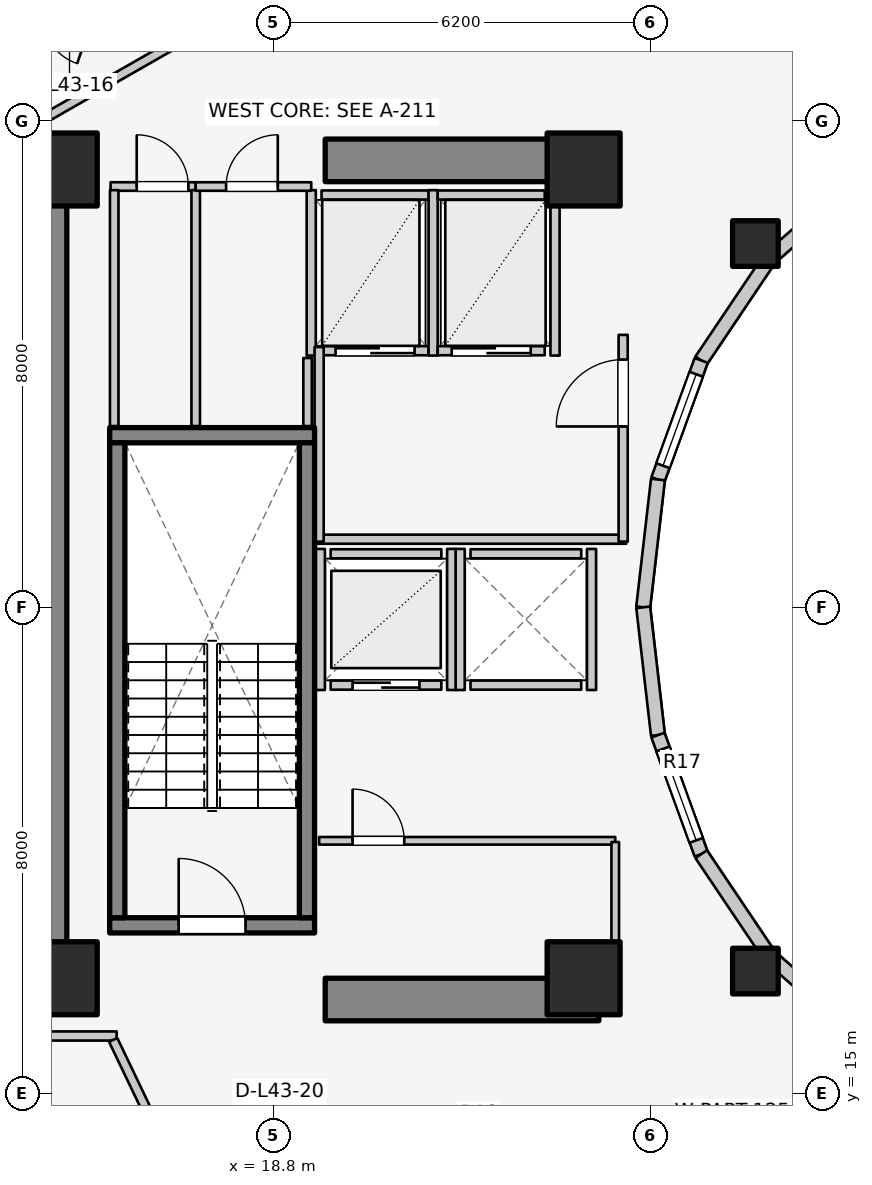
"""IFC4 building model, lengths in metres.
Left out: names, types, materials, properties, quantities, classifications, styles, units other than length and angle.
Written with IfcOpenShell. Run it as: python <this file> out.ifc"""

import sys

from ifc_helpers import new_model, si_unit, direction, frame, frame_2d, origin, origin_2d, place, context, subcontext, project, spatial, rectangle, extrude, element, fill, save


model = new_model("IFC4")
c1 = context("Model", 3, precision=1e-05, world=origin(), true_north=direction((0.0, 1.0)))
c2 = subcontext(c1, "Body", "Model", "MODEL_VIEW")
j1 = project(units=[si_unit("LENGTHUNIT", "METRE"), si_unit("PLANEANGLEUNIT", "RADIAN")], contexts=[c1])
p1 = place(None, origin())
s1 = spatial("IfcSite", under=j1, at=p1, CompositionType="ELEMENT")
p2 = place(p1, origin())
s2 = spatial("IfcBuilding", under=s1, at=p2, CompositionType="ELEMENT")
p3 = place(p2, frame((0.0, 0.0, 143.6)))
s3 = spatial("IfcBuildingStorey", under=s2, at=p3, CompositionType="ELEMENT", Elevation=143.6)
p4 = place(p3, frame((15.05, 17.05, 0.0), z_axis=(0.0, 0.0, 1.0), x_axis=(0.0, 1.0, 0.0)))
e1 = element("IfcWall", 1, at=p4, inside=s3, PredefinedType="SHEAR", context=c2, shape_type="SweptSolid", body=[
    extrude(rectangle(XDim=12.8, YDim=0.7, at=frame_2d((6.4, 0.0))), origin(), (0.0, 0.0, 1.0), 3.1),
])
for number, where, z_axis, x_axis in (
    (2, (19.65, 16.55, 0.0), (0.0, 0.0, 1.0), (1.0, 0.0, 0.0)),
    (3, (19.65, 30.35, 0.0), (0.0, 0.0, 1.0), (1.0, 0.0, 0.0)),
):
    element("IfcWall", number, at=place(p3, frame(where, z_axis=z_axis, x_axis=x_axis)), inside=s3, PredefinedType="SHEAR", context=c2, shape_type="SweptSolid", body=[
        extrude(rectangle(XDim=4.5, YDim=0.7, at=frame_2d((2.25, 0.0))), origin(), (0.0, 0.0, 1.0), 3.1),
    ])
p5 = place(p3, frame((16.105, 17.77, 0.0), z_axis=(0.0, 0.0, 1.0), x_axis=(1.0, 0.0, 0.0)))
e4 = element("IfcWall", 4, at=p5, inside=s3, PredefinedType="SOLIDWALL", context=c2, shape_type="SweptSolid", body=[
    extrude(rectangle(XDim=3.37, YDim=0.25, at=frame_2d((1.685, 0.0))), origin(), (0.0, 0.0, 1.0), 3.1),
])
p6 = place(p5, frame((1.135, 0.0, 0.0)))
e5 = element("IfcOpeningElement", 5, at=p6, cuts=e4, PredefinedType="OPENING", context=c2, shape_type="SweptSolid", body=[
    extrude(rectangle(XDim=1.1, YDim=2.1, at=frame_2d((0.55, 1.05))), frame((0.0, 0.135, 0.0), z_axis=(0.0, -1.0, 0.0), x_axis=(1.0, 0.0, 0.0)), (0.0, 0.0, 1.0), 0.27),
])
p7 = place(p3, frame((16.105, 25.83, 0.0), z_axis=(0.0, 0.0, 1.0), x_axis=(1.0, 0.0, 0.0)))
e6 = element("IfcWall", 6, at=p7, inside=s3, PredefinedType="SOLIDWALL", context=c2, shape_type="SweptSolid", body=[
    extrude(rectangle(XDim=3.37, YDim=0.25, at=frame_2d((1.685, 0.0))), origin(), (0.0, 0.0, 1.0), 3.1),
])
for number, where, z_axis, x_axis in (
    (7, (16.23, 17.895, 0.0), (0.0, 0.0, 1.0), (0.0, 1.0, 0.0)),
    (8, (19.35, 17.895, 0.0), (0.0, 0.0, 1.0), (0.0, 1.0, 0.0)),
):
    element("IfcWall", number, at=place(p3, frame(where, z_axis=z_axis, x_axis=x_axis)), inside=s3, PredefinedType="SOLIDWALL", context=c2, shape_type="SweptSolid", body=[
        extrude(rectangle(XDim=7.81, YDim=0.25, at=frame_2d((3.905, 0.0))), origin(), (0.0, 0.0, 1.0), 3.1),
    ])
for number, where, z_axis, x_axis in (
    (9, (15.3, 16.9, 0.0), (0.0, 0.0, 1.0), (1.0, 0.0, 0.0)),
    (10, (23.9, 16.9, 0.0), (0.0, 0.0, 1.0), (1.0, 0.0, 0.0)),
    (11, (23.9, 30.2, 0.0), (0.0, 0.0, 1.0), (1.0, 0.0, 0.0)),
    (12, (15.3, 30.2, 0.0), (0.0, 0.0, 1.0), (1.0, 0.0, 0.0)),
):
    element("IfcColumn", number, at=place(p3, frame(where, z_axis=z_axis, x_axis=x_axis)), inside=s3, PredefinedType="COLUMN", context=c2, shape_type="SweptSolid", body=[
        extrude(rectangle(XDim=1.2, YDim=1.2, at=origin_2d()), origin(), (0.0, 0.0, 1.0), 3.1),
    ])
for number, where, z_axis, x_axis in (
    (13, (26.725, 28.982, 0.0), (0.0, 0.0, 1.0), (1.0, 0.0, 0.0)),
    (14, (26.725, 17.018, 0.0), (0.0, 0.0, 1.0), (1.0, 0.0, 0.0)),
):
    element("IfcColumn", number, at=place(p3, frame(where, z_axis=z_axis, x_axis=x_axis)), inside=s3, PredefinedType="COLUMN", context=c2, shape_type="SweptSolid", body=[
        extrude(rectangle(XDim=0.75, YDim=0.75, at=origin_2d()), origin(), (0.0, 0.0, 1.0), 3.1),
    ])
p8 = place(p3, frame((28.44, 30.032, 0.0), z_axis=(0.0, 0.0, 1.0), x_axis=(-0.752576694707, -0.658504607869, 0.0)))
e15 = element("IfcWall", 15, at=p8, inside=s3, PredefinedType="STANDARD", context=c2, shape_type="SweptSolid", body=[
    extrude(rectangle(XDim=1.959, YDim=0.23, at=frame_2d((0.98, 0.0))), origin(), (0.0, 0.0, 1.0), 2.16),
])
p9 = place(p3, frame((26.965, 28.742, 0.0), z_axis=(0.0, 0.0, 1.0), x_axis=(-0.558197800898, -0.829707909492, 0.0)))
e16 = element("IfcWall", 16, at=p9, inside=s3, PredefinedType="STANDARD", context=c2, shape_type="SweptSolid", body=[
    extrude(rectangle(XDim=2.027, YDim=0.23, at=frame_2d((1.013, 0.0))), origin(), (0.0, 0.0, 1.0), 2.16),
])
p10 = place(p3, frame((25.834, 27.06, 0.0), z_axis=(0.0, 0.0, 1.0), x_axis=(-0.341423187295, -0.93990968033, 0.0)))
e17 = element("IfcWall", 17, at=p10, inside=s3, PredefinedType="STANDARD", context=c2, shape_type="SweptSolid", body=[
    extrude(rectangle(XDim=2.084, YDim=0.23, at=frame_2d((1.042, 0.0))), origin(), (0.0, 0.0, 1.0), 2.84),
])
p11 = place(p10, frame((0.242, 0.0, 0.85)))
e18 = element("IfcOpeningElement", 18, at=p11, cuts=e17, PredefinedType="OPENING", context=c2, shape_type="SweptSolid", body=[
    extrude(rectangle(XDim=1.6, YDim=1.65, at=frame_2d((0.8, 0.825))), frame((0.0, 0.125, 0.0), z_axis=(0.0, -1.0, 0.0), x_axis=(1.0, 0.0, 0.0)), (0.0, 0.0, 1.0), 0.25),
])
for number, where, z_axis, x_axis in (
    (19, (25.123, 25.102, 0.0), (0.0, 0.0, 1.0), (-0.115, -0.993, 0.0)),
    (20, (24.88, 23.0, 0.0), (0.0, 0.0, 1.0), (0.115, -0.993, 0.0)),
):
    element("IfcWall", number, at=place(p3, frame(where, z_axis=z_axis, x_axis=x_axis)), inside=s3, PredefinedType="STANDARD", context=c2, shape_type="SweptSolid", body=[
        extrude(rectangle(XDim=2.115, YDim=0.23, at=frame_2d((1.058, 0.0))), origin(), (0.0, 0.0, 1.0), 2.84),
    ])
p12 = place(p3, frame((25.123, 20.898, 0.0), z_axis=(0.0, 0.0, 1.0), x_axis=(0.341423187295, -0.93990968033, 0.0)))
e21 = element("IfcWall", 21, at=p12, inside=s3, PredefinedType="STANDARD", context=c2, shape_type="SweptSolid", body=[
    extrude(rectangle(XDim=2.084, YDim=0.23, at=frame_2d((1.042, 0.0))), origin(), (0.0, 0.0, 1.0), 2.84),
])
p13 = place(p12, frame((0.242, 0.0, 0.85)))
e22 = element("IfcOpeningElement", 22, at=p13, cuts=e21, PredefinedType="OPENING", context=c2, shape_type="SweptSolid", body=[
    extrude(rectangle(XDim=1.6, YDim=1.65, at=frame_2d((0.8, 0.825))), frame((0.0, 0.125, 0.0), z_axis=(0.0, -1.0, 0.0), x_axis=(1.0, 0.0, 0.0)), (0.0, 0.0, 1.0), 0.25),
])
p14 = place(p3, frame((25.834, 18.94, 0.0), z_axis=(0.0, 0.0, 1.0), x_axis=(0.558197800898, -0.829707909492, 0.0)))
e23 = element("IfcWall", 23, at=p14, inside=s3, PredefinedType="STANDARD", context=c2, shape_type="SweptSolid", body=[
    extrude(rectangle(XDim=2.027, YDim=0.23, at=frame_2d((1.013, 0.0))), origin(), (0.0, 0.0, 1.0), 2.16),
])
p15 = place(p3, frame((26.965, 17.258, 0.0), z_axis=(0.0, 0.0, 1.0), x_axis=(0.752576694707, -0.658504607869, 0.0)))
e24 = element("IfcWall", 24, at=p15, inside=s3, PredefinedType="STANDARD", context=c2, shape_type="SweptSolid", body=[
    extrude(rectangle(XDim=1.959, YDim=0.23, at=frame_2d((0.98, 0.0))), origin(), (0.0, 0.0, 1.0), 2.16),
])
p16 = place(p3, frame((19.74, 21.72, 0.0), z_axis=(0.0, 0.0, 1.0), x_axis=(1.0, 0.0, 0.0)))
e25 = element("IfcWall", 25, at=p16, inside=s3, PredefinedType="SOLIDWALL", context=c2, shape_type="SweptSolid", body=[
    extrude(rectangle(XDim=1.82, YDim=0.15, at=frame_2d((0.91, 0.0))), origin(), (0.0, 0.0, 1.0), 2.855),
])
p17 = place(p16, frame((0.36, 0.0, 0.0)))
e26 = element("IfcOpeningElement", 26, at=p17, cuts=e25, PredefinedType="OPENING", context=c2, shape_type="SweptSolid", body=[
    extrude(rectangle(XDim=1.1, YDim=2.1, at=frame_2d((0.55, 1.05))), frame((0.0, 0.085, 0.0), z_axis=(0.0, -1.0, 0.0), x_axis=(1.0, 0.0, 0.0)), (0.0, 0.0, 1.0), 0.17),
])
p18 = place(p3, frame((19.74, 23.88, 0.0), z_axis=(0.0, 0.0, 1.0), x_axis=(1.0, 0.0, 0.0)))
e27 = element("IfcWall", 27, at=p18, inside=s3, PredefinedType="SOLIDWALL", context=c2, shape_type="SweptSolid", body=[
    extrude(rectangle(XDim=1.82, YDim=0.15, at=frame_2d((0.91, 0.0))), origin(), (0.0, 0.0, 1.0), 2.855),
])
for number, where, z_axis, x_axis in (
    (28, (19.57, 21.64, 0.0), (0.0, 0.0, 1.0), (0.0, 1.0, 0.0)),
    (29, (21.73, 21.64, 0.0), (0.0, 0.0, 1.0), (0.0, 1.0, 0.0)),
):
    element("IfcWall", number, at=place(p3, frame(where, z_axis=z_axis, x_axis=x_axis)), inside=s3, PredefinedType="SOLIDWALL", context=c2, shape_type="SweptSolid", body=[
        extrude(rectangle(XDim=2.32, YDim=0.15, at=frame_2d((1.16, 0.0))), origin(), (0.0, 0.0, 1.0), 2.855),
    ])
for number, where, z_axis, x_axis in (
    (30, (22.04, 21.72, 0.0), (0.0, 0.0, 1.0), (1.0, 0.0, 0.0)),
    (31, (22.04, 23.88, 0.0), (0.0, 0.0, 1.0), (1.0, 0.0, 0.0)),
):
    element("IfcWall", number, at=place(p3, frame(where, z_axis=z_axis, x_axis=x_axis)), inside=s3, PredefinedType="SOLIDWALL", context=c2, shape_type="SweptSolid", body=[
        extrude(rectangle(XDim=1.82, YDim=0.15, at=frame_2d((0.91, 0.0))), origin(), (0.0, 0.0, 1.0), 2.12),
    ])
p19 = place(p3, frame((21.87, 21.64, 0.0), z_axis=(0.0, 0.0, 1.0), x_axis=(0.0, 1.0, 0.0)))
e32 = element("IfcWall", 32, at=p19, inside=s3, PredefinedType="SOLIDWALL", context=c2, shape_type="SweptSolid", body=[
    extrude(rectangle(XDim=2.32, YDim=0.15, at=frame_2d((1.16, 0.0))), origin(), (0.0, 0.0, 1.0), 2.855),
])
p20 = place(p3, frame((24.03, 21.64, 0.0), z_axis=(0.0, 0.0, 1.0), x_axis=(0.0, 1.0, 0.0)))
e33 = element("IfcWall", 33, at=p20, inside=s3, PredefinedType="SOLIDWALL", context=c2, shape_type="SweptSolid", body=[
    extrude(rectangle(XDim=2.32, YDim=0.15, at=frame_2d((1.16, 0.0))), origin(), (0.0, 0.0, 1.0), 2.12),
])
p21 = place(p3, frame((19.59, 27.22, 0.0), z_axis=(0.0, 0.0, 1.0), x_axis=(1.0, 0.0, 0.0)))
e34 = element("IfcWall", 34, at=p21, inside=s3, PredefinedType="SOLIDWALL", context=c2, shape_type="SweptSolid", body=[
    extrude(rectangle(XDim=1.76, YDim=0.15, at=frame_2d((0.88, 0.0))), origin(), (0.0, 0.0, 1.0), 2.855),
])
p22 = place(p21, frame((0.23, 0.0, 0.0)))
e35 = element("IfcOpeningElement", 35, at=p22, cuts=e34, PredefinedType="OPENING", context=c2, shape_type="SweptSolid", body=[
    extrude(rectangle(XDim=1.3, YDim=2.1, at=frame_2d((0.65, 1.05))), frame((0.0, 0.085, 0.0), z_axis=(0.0, -1.0, 0.0), x_axis=(1.0, 0.0, 0.0)), (0.0, 0.0, 1.0), 0.17),
])
p23 = place(p3, frame((19.59, 29.78, 0.0), z_axis=(0.0, 0.0, 1.0), x_axis=(1.0, 0.0, 0.0)))
e36 = element("IfcWall", 36, at=p23, inside=s3, PredefinedType="SOLIDWALL", context=c2, shape_type="SweptSolid", body=[
    extrude(rectangle(XDim=1.76, YDim=0.15, at=frame_2d((0.88, 0.0))), origin(), (0.0, 0.0, 1.0), 2.855),
])
for number, where, z_axis, x_axis in (
    (37, (19.42, 27.14, 0.0), (0.0, 0.0, 1.0), (0.0, 1.0, 0.0)),
    (38, (21.425, 27.14, 0.0), (0.0, 0.0, 1.0), (0.0, 1.0, 0.0)),
):
    element("IfcWall", number, at=place(p3, frame(where, z_axis=z_axis, x_axis=x_axis)), inside=s3, PredefinedType="SOLIDWALL", context=c2, shape_type="SweptSolid", body=[
        extrude(rectangle(XDim=2.72, YDim=0.15, at=frame_2d((1.36, 0.0))), origin(), (0.0, 0.0, 1.0), 2.855),
    ])
p24 = place(p3, frame((21.5, 27.22, 0.0), z_axis=(0.0, 0.0, 1.0), x_axis=(1.0, 0.0, 0.0)))
e39 = element("IfcWall", 39, at=p24, inside=s3, PredefinedType="SOLIDWALL", context=c2, shape_type="SweptSolid", body=[
    extrude(rectangle(XDim=1.76, YDim=0.15, at=frame_2d((0.88, 0.0))), origin(), (0.0, 0.0, 1.0), 2.855),
])
p25 = place(p24, frame((0.23, 0.0, 0.0)))
e40 = element("IfcOpeningElement", 40, at=p25, cuts=e39, PredefinedType="OPENING", context=c2, shape_type="SweptSolid", body=[
    extrude(rectangle(XDim=1.3, YDim=2.1, at=frame_2d((0.65, 1.05))), frame((0.0, 0.085, 0.0), z_axis=(0.0, -1.0, 0.0), x_axis=(1.0, 0.0, 0.0)), (0.0, 0.0, 1.0), 0.17),
])
p26 = place(p3, frame((21.5, 29.78, 0.0), z_axis=(0.0, 0.0, 1.0), x_axis=(1.0, 0.0, 0.0)))
e41 = element("IfcWall", 41, at=p26, inside=s3, PredefinedType="SOLIDWALL", context=c2, shape_type="SweptSolid", body=[
    extrude(rectangle(XDim=1.76, YDim=0.15, at=frame_2d((0.88, 0.0))), origin(), (0.0, 0.0, 1.0), 2.855),
])
p27 = place(p3, frame((23.43, 27.14, 0.0), z_axis=(0.0, 0.0, 1.0), x_axis=(0.0, 1.0, 0.0)))
e42 = element("IfcWall", 42, at=p27, inside=s3, PredefinedType="SOLIDWALL", context=c2, shape_type="SweptSolid", body=[
    extrude(rectangle(XDim=2.72, YDim=0.15, at=frame_2d((1.36, 0.0))), origin(), (0.0, 0.0, 1.0), 2.855),
])
p28 = place(p3, frame((19.52, 24.12, 0.0), z_axis=(0.0, 0.0, 1.0), x_axis=(1.0, 0.0, 0.0)))
e43 = element("IfcWall", 43, at=p28, inside=s3, PredefinedType="PARTITIONING", context=c2, shape_type="SweptSolid", body=[
    extrude(rectangle(XDim=5.08, YDim=0.15, at=frame_2d((2.54, 0.0))), origin(), (0.0, 0.0, 1.0), 2.12),
])
p29 = place(p3, frame((19.55, 24.08, 0.0), z_axis=(0.0, 0.0, 1.0), x_axis=(0.0, 1.0, 0.0)))
e44 = element("IfcWall", 44, at=p29, inside=s3, PredefinedType="PARTITIONING", context=c2, shape_type="SweptSolid", body=[
    extrude(rectangle(XDim=3.2, YDim=0.15, at=frame_2d((1.6, 0.0))), origin(), (0.0, 0.0, 1.0), 2.855),
])
p30 = place(p3, frame((24.55, 24.08, 0.0), z_axis=(0.0, 0.0, 1.0), x_axis=(0.0, 1.0, 0.0)))
e45 = element("IfcWall", 45, at=p30, inside=s3, PredefinedType="PARTITIONING", context=c2, shape_type="SweptSolid", body=[
    extrude(rectangle(XDim=3.4, YDim=0.15, at=frame_2d((1.7, 0.0))), origin(), (0.0, 0.0, 1.0), 2.855),
])
p31 = place(p30, frame((1.894, 0.0, 0.0)))
e46 = element("IfcOpeningElement", 46, at=p31, cuts=e45, PredefinedType="OPENING", context=c2, shape_type="SweptSolid", body=[
    extrude(rectangle(XDim=1.1, YDim=2.1, at=frame_2d((0.55, 1.05))), frame((0.0, 0.085, 0.0), z_axis=(0.0, -1.0, 0.0), x_axis=(1.0, 0.0, 0.0)), (0.0, 0.0, 1.0), 0.17),
])
p32 = place(p3, frame((19.55, 19.16, 0.0), z_axis=(0.0, 0.0, 1.0), x_axis=(1.0, 0.0, 0.0)))
e47 = element("IfcWall", 47, at=p32, inside=s3, PredefinedType="PARTITIONING", context=c2, shape_type="SweptSolid", body=[
    extrude(rectangle(XDim=4.87, YDim=0.125, at=frame_2d((2.435, 0.0))), origin(), (0.0, 0.0, 1.0), 2.12),
])
p33 = place(p32, frame((0.55, 0.0, 0.0)))
e48 = element("IfcOpeningElement", 48, at=p33, cuts=e47, PredefinedType="OPENING", context=c2, shape_type="SweptSolid", body=[
    extrude(rectangle(XDim=0.85, YDim=2.05, at=frame_2d((0.425, 1.025))), frame((0.0, 0.073, 0.0), z_axis=(0.0, -1.0, 0.0), x_axis=(1.0, 0.0, 0.0)), (0.0, 0.0, 1.0), 0.145),
])
p34 = place(p3, frame((24.42, 17.1, 0.0), z_axis=(0.0, 0.0, 1.0), x_axis=(0.0, 1.0, 0.0)))
e49 = element("IfcWall", 49, at=p34, inside=s3, PredefinedType="PARTITIONING", context=c2, shape_type="SweptSolid", body=[
    extrude(rectangle(XDim=2.04, YDim=0.125, at=frame_2d((1.02, 0.0))), origin(), (0.0, 0.0, 1.0), 2.232),
])
p35 = place(p3, frame((16.12, 29.92, 0.0), z_axis=(0.0, 0.0, 1.0), x_axis=(1.0, 0.0, 0.0)))
e50 = element("IfcWall", 50, at=p35, inside=s3, PredefinedType="PLUMBINGWALL", context=c2, shape_type="SweptSolid", body=[
    extrude(rectangle(XDim=1.4, YDim=0.14, at=frame_2d((0.7, 0.0))), origin(), (0.0, 0.0, 1.0), 2.855),
])
p36 = place(p35, frame((0.43, 0.0, 0.0)))
e51 = element("IfcOpeningElement", 51, at=p36, cuts=e50, PredefinedType="OPENING", context=c2, shape_type="SweptSolid", body=[
    extrude(rectangle(XDim=0.85, YDim=2.05, at=frame_2d((0.425, 1.025))), frame((0.0, 0.08, 0.0), z_axis=(0.0, -1.0, 0.0), x_axis=(1.0, 0.0, 0.0)), (0.0, 0.0, 1.0), 0.16),
])
for number, where, z_axis, x_axis in (
    (52, (16.18, 25.98, 0.0), (0.0, 0.0, 1.0), (0.0, 1.0, 0.0)),
    (53, (17.52, 25.98, 0.0), (0.0, 0.0, 1.0), (0.0, 1.0, 0.0)),
):
    element("IfcWall", number, at=place(p3, frame(where, z_axis=z_axis, x_axis=x_axis)), inside=s3, PredefinedType="PLUMBINGWALL", context=c2, shape_type="SweptSolid", body=[
        extrude(rectangle(XDim=3.88, YDim=0.14, at=frame_2d((1.94, 0.0))), origin(), (0.0, 0.0, 1.0), 2.855),
    ])
p37 = place(p3, frame((17.52, 29.92, 0.0), z_axis=(0.0, 0.0, 1.0), x_axis=(1.0, 0.0, 0.0)))
e54 = element("IfcWall", 54, at=p37, inside=s3, PredefinedType="PLUMBINGWALL", context=c2, shape_type="SweptSolid", body=[
    extrude(rectangle(XDim=1.9, YDim=0.14, at=frame_2d((0.95, 0.0))), origin(), (0.0, 0.0, 1.0), 2.855),
])
p38 = place(p37, frame((0.5, 0.0, 0.0)))
e55 = element("IfcOpeningElement", 55, at=p38, cuts=e54, PredefinedType="OPENING", context=c2, shape_type="SweptSolid", body=[
    extrude(rectangle(XDim=0.85, YDim=2.05, at=frame_2d((0.425, 1.025))), frame((0.0, 0.08, 0.0), z_axis=(0.0, -1.0, 0.0), x_axis=(1.0, 0.0, 0.0)), (0.0, 0.0, 1.0), 0.16),
])
p39 = place(p3, frame((19.36, 25.98, 0.0), z_axis=(0.0, 0.0, 1.0), x_axis=(0.0, 1.0, 0.0)))
e56 = element("IfcWall", 56, at=p39, inside=s3, PredefinedType="PLUMBINGWALL", context=c2, shape_type="SweptSolid", body=[
    extrude(rectangle(XDim=1.12, YDim=0.14, at=frame_2d((0.56, 0.0))), origin(), (0.0, 0.0, 1.0), 2.855),
])
p40 = place(p3, frame((17.243, 32.305, 0.0), z_axis=(0.0, 0.0, 1.0), x_axis=(-0.867991349648, -0.496579315857, 0.0)))
e57 = element("IfcWall", 57, at=p40, inside=s3, PredefinedType="PARTITIONING", context=c2, shape_type="SweptSolid", body=[
    extrude(rectangle(XDim=2.567, YDim=0.15, at=frame_2d((1.283, 0.0))), origin(), (0.0, 0.0, 1.0), 2.22),
])
p41 = place(p3, frame((10.96, 15.95, 0.0), z_axis=(0.0, 0.0, 1.0), x_axis=(1.0, 0.0, 0.0)))
e58 = element("IfcWall", 58, at=p41, inside=s3, PredefinedType="PARTITIONING", context=c2, shape_type="SweptSolid", body=[
    extrude(rectangle(XDim=5.26, YDim=0.15, at=frame_2d((2.63, 0.0))), origin(), (0.0, 0.0, 1.0), 2.22),
])
p42 = place(p3, frame((17.222, 13.675, 0.0), z_axis=(0.0, 0.0, 1.0), x_axis=(-0.431973389813, 0.901886351207, 0.0)))
e59 = element("IfcWall", 59, at=p42, inside=s3, PredefinedType="PARTITIONING", context=c2, shape_type="SweptSolid", body=[
    extrude(rectangle(XDim=2.452, YDim=0.15, at=frame_2d((1.226, 0.0))), origin(), (0.0, 0.0, 1.0), 2.855),
])
p43 = place(p3, frame((28.45, 15.985, 0.0), z_axis=(0.0, 0.0, 1.0), x_axis=(-0.524565340045, -0.851370192116, 0.0)))
e60 = element("IfcWall", 60, at=p43, inside=s3, PredefinedType="PARTITIONING", context=c2, shape_type="SweptSolid", body=[
    extrude(rectangle(XDim=3.027, YDim=0.125, at=frame_2d((1.514, 0.0))), origin(), (0.0, 0.0, 1.0), 2.299),
])
p44 = place(p11, origin())
e61 = element("IfcWindow", 61, at=p44, inside=s3, PartitioningType="SINGLE_PANEL", PredefinedType="WINDOW", context=c2, shape_type="SweptSolid", body=[
    extrude(rectangle(XDim=1.6, YDim=1.65, at=frame_2d((0.8, 0.825))), frame((0.0, 0.03, 0.0), z_axis=(0.0, -1.0, 0.0), x_axis=(1.0, 0.0, 0.0)), (0.0, 0.0, 1.0), 0.06),
])
fill(e18, e61)
p45 = place(p13, origin())
e62 = element("IfcWindow", 62, at=p45, inside=s3, PartitioningType="SINGLE_PANEL", PredefinedType="WINDOW", context=c2, shape_type="SweptSolid", body=[
    extrude(rectangle(XDim=1.6, YDim=1.65, at=frame_2d((0.8, 0.825))), frame((0.0, 0.03, 0.0), z_axis=(0.0, -1.0, 0.0), x_axis=(1.0, 0.0, 0.0)), (0.0, 0.0, 1.0), 0.06),
])
fill(e22, e62)
p46 = place(p6, origin())
e63 = element("IfcDoor", 63, at=p46, inside=s3, OperationType="SINGLE_SWING_LEFT", PredefinedType="DOOR", context=c2, shape_type="SweptSolid", body=[
    extrude(rectangle(XDim=1.1, YDim=2.1, at=frame_2d((0.55, 1.05))), frame((0.0, 0.025, 0.0), z_axis=(0.0, -1.0, 0.0), x_axis=(1.0, 0.0, 0.0)), (0.0, 0.0, 1.0), 0.05),
])
fill(e5, e63)
p47 = place(p17, origin())
e64 = element("IfcDoor", 64, at=p47, inside=s3, OperationType="DOUBLE_DOOR_SLIDING", PredefinedType="DOOR", context=c2, shape_type="SweptSolid", body=[
    extrude(rectangle(XDim=1.1, YDim=2.1, at=frame_2d((0.55, 1.05))), frame((0.0, 0.025, 0.0), z_axis=(0.0, -1.0, 0.0), x_axis=(1.0, 0.0, 0.0)), (0.0, 0.0, 1.0), 0.05),
])
fill(e26, e64)
p48 = place(p22, origin())
e65 = element("IfcDoor", 65, at=p48, inside=s3, OperationType="DOUBLE_DOOR_SLIDING", PredefinedType="DOOR", context=c2, shape_type="SweptSolid", body=[
    extrude(rectangle(XDim=1.3, YDim=2.1, at=frame_2d((0.65, 1.05))), frame((0.0, 0.025, 0.0), z_axis=(0.0, -1.0, 0.0), x_axis=(1.0, 0.0, 0.0)), (0.0, 0.0, 1.0), 0.05),
])
fill(e35, e65)
p49 = place(p25, origin())
e66 = element("IfcDoor", 66, at=p49, inside=s3, OperationType="DOUBLE_DOOR_SLIDING", PredefinedType="DOOR", context=c2, shape_type="SweptSolid", body=[
    extrude(rectangle(XDim=1.3, YDim=2.1, at=frame_2d((0.65, 1.05))), frame((0.0, 0.025, 0.0), z_axis=(0.0, -1.0, 0.0), x_axis=(1.0, 0.0, 0.0)), (0.0, 0.0, 1.0), 0.05),
])
fill(e40, e66)
p50 = place(p31, origin())
e67 = element("IfcDoor", 67, at=p50, inside=s3, OperationType="SINGLE_SWING_LEFT", PredefinedType="DOOR", context=c2, shape_type="SweptSolid", body=[
    extrude(rectangle(XDim=1.1, YDim=2.1, at=frame_2d((0.55, 1.05))), frame((0.0, 0.025, 0.0), z_axis=(0.0, -1.0, 0.0), x_axis=(1.0, 0.0, 0.0)), (0.0, 0.0, 1.0), 0.05),
])
fill(e46, e67)
p51 = place(p33, origin())
e68 = element("IfcDoor", 68, at=p51, inside=s3, OperationType="SINGLE_SWING_LEFT", PredefinedType="DOOR", context=c2, shape_type="SweptSolid", body=[
    extrude(rectangle(XDim=0.85, YDim=2.05, at=frame_2d((0.425, 1.025))), frame((0.0, 0.025, 0.0), z_axis=(0.0, -1.0, 0.0), x_axis=(1.0, 0.0, 0.0)), (0.0, 0.0, 1.0), 0.05),
])
fill(e48, e68)
p52 = place(p36, origin())
e69 = element("IfcDoor", 69, at=p52, inside=s3, OperationType="SINGLE_SWING_LEFT", PredefinedType="DOOR", context=c2, shape_type="SweptSolid", body=[
    extrude(rectangle(XDim=0.85, YDim=2.05, at=frame_2d((0.425, 1.025))), frame((0.0, 0.025, 0.0), z_axis=(0.0, -1.0, 0.0), x_axis=(1.0, 0.0, 0.0)), (0.0, 0.0, 1.0), 0.05),
])
fill(e51, e69)
p53 = place(p38, origin())
e70 = element("IfcDoor", 70, at=p53, inside=s3, OperationType="SINGLE_SWING_RIGHT", PredefinedType="DOOR", context=c2, shape_type="SweptSolid", body=[
    extrude(rectangle(XDim=0.85, YDim=2.05, at=frame_2d((0.425, 1.025))), frame((0.0, 0.025, 0.0), z_axis=(0.0, -1.0, 0.0), x_axis=(1.0, 0.0, 0.0)), (0.0, 0.0, 1.0), 0.05),
])
fill(e55, e70)
save(model, sys.argv[1])
